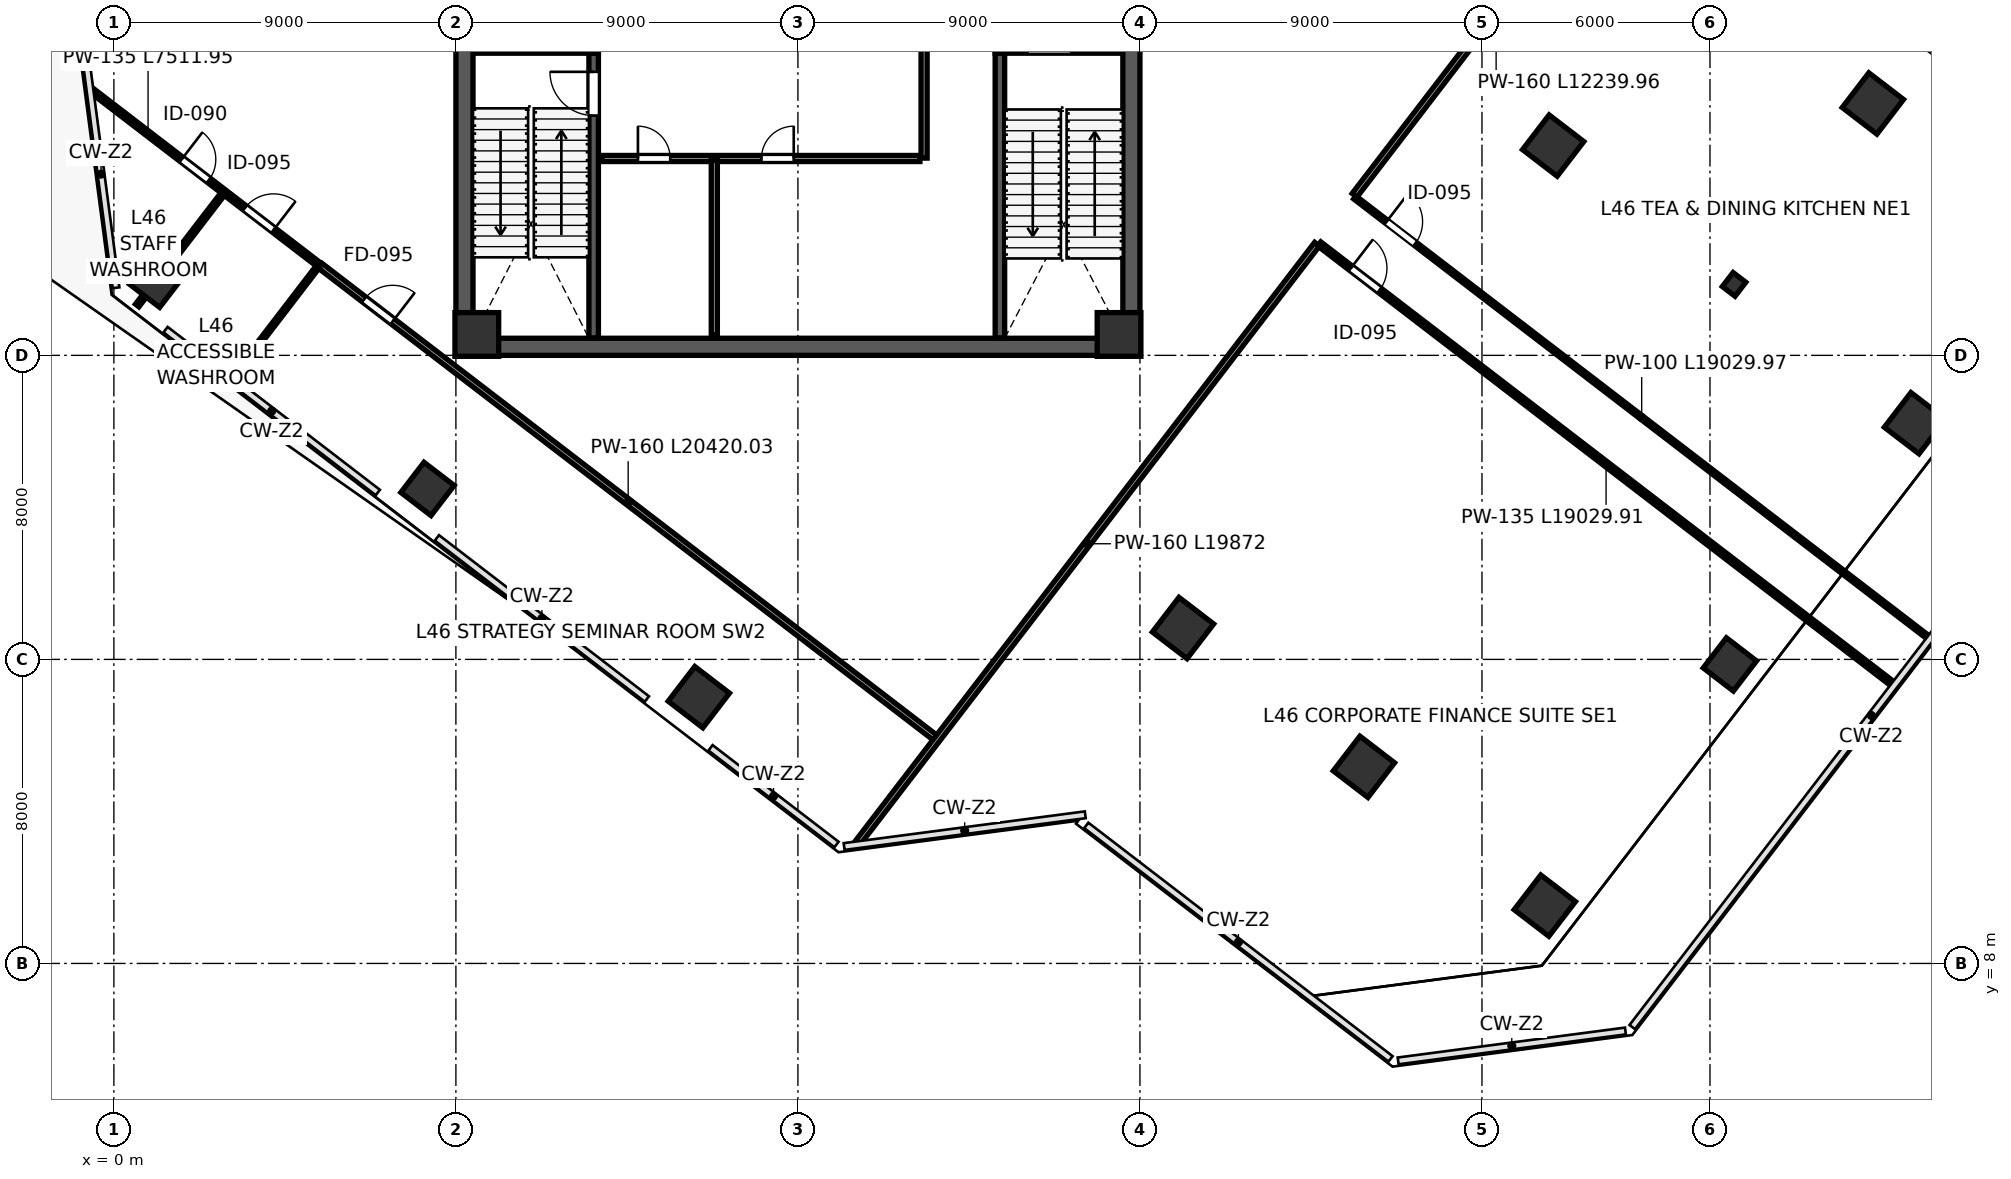
"""IFC4 building model, lengths in metres.
Left out: names, types, materials, properties, quantities, classifications, styles, units other than length and angle.
Written with IfcOpenShell. Run it as: python <this file> out.ifc"""

import sys

from ifc_helpers import new_model, si_unit, direction, frame, frame_2d, origin, origin_2d, place, context, subcontext, project, spatial, rectangle, i_section, extrude, source, transform, mapped, element, fill, save


model = new_model("IFC4")
c1 = context("Model", 3, precision=1e-05, world=origin(), true_north=direction((0.0, 1.0)))
c2 = subcontext(c1, "Body", "Model", "MODEL_VIEW")
j1 = project(units=[si_unit("LENGTHUNIT", "METRE"), si_unit("PLANEANGLEUNIT", "RADIAN")], contexts=[c1])
p1 = place(None, origin())
s1 = spatial("IfcSite", under=j1, at=p1, CompositionType="ELEMENT")
p2 = place(p1, origin())
s2 = spatial("IfcBuilding", under=s1, at=p2, CompositionType="ELEMENT")
p3 = place(p2, frame((0.0, 0.0, 204.4)))
s3 = spatial("IfcBuildingStorey", under=s2, at=p3, CompositionType="ELEMENT", Elevation=204.4)
m1 = source(origin(), c2, "Body", "SweptSolid", [
    extrude(rectangle(XDim=1.15, YDim=1.15, at=origin_2d()), origin(), (0.0, 0.0, 1.0), 5.399),
])
for number, where, z_axis, x_axis in (
    (1, (9.55, 24.55, 0.001), (0.0, 0.0, 1.0), (1.0, 0.0, 0.0)),
    (2, (26.45, 24.55, 0.001), (0.0, 0.0, 1.0), (1.0, 0.0, 0.0)),
):
    element("IfcColumn", number, at=place(p3, frame(where, z_axis=z_axis, x_axis=x_axis)), inside=s3, PredefinedType="COLUMN", context=c2, shape_type="MappedRepresentation", body=[
        mapped(m1, transform((0.0, 0.0, 0.0), scale=1.0)),
    ])
m2 = source(origin(), c2, "Body", "SweptSolid", [
    extrude(rectangle(XDim=1.0, YDim=1.0, at=origin_2d()), origin(), (0.0, 0.0, 1.0), 5.399),
])
for number, where, z_axis, x_axis in (
    (3, (1.112, 25.964, 0.001), (0.0, 0.0, 1.0), (-0.793, 0.609, 0.0)),
    (4, (8.253, 20.485, 0.001), (0.0, 0.0, 1.0), (-0.793, 0.609, 0.0)),
):
    element("IfcColumn", number, at=place(p3, frame(where, z_axis=z_axis, x_axis=x_axis)), inside=s3, PredefinedType="COLUMN", context=c2, shape_type="MappedRepresentation", body=[
        mapped(m2, transform((0.0, 0.0, 0.0), scale=1.0)),
    ])
m3 = source(origin(), c2, "Body", "SweptSolid", [
    extrude(rectangle(XDim=1.15, YDim=1.15, at=origin_2d()), origin(), (0.0, 0.0, 1.0), 5.399),
])
p4 = place(p3, frame((15.393, 15.006, 0.001), z_axis=(0.0, 0.0, 1.0), x_axis=(-0.793353340291, 0.608761429009, 0.0)))
e5 = element("IfcColumn", 5, at=p4, inside=s3, PredefinedType="COLUMN", context=c2, shape_type="MappedRepresentation", body=[
    mapped(m3, transform((0.0, 0.0, 0.0), scale=1.0)),
])
for number, where, z_axis, x_axis in (
    (6, (28.134, 16.826, 0.001), (0.0, 0.0, 1.0), (-0.793, 0.609, 0.0)),
    (7, (37.874, 29.52, 0.001), (0.0, 0.0, 1.0), (-0.793, 0.609, 0.0)),
    (8, (32.894, 13.174, 0.001), (0.0, 0.0, 1.0), (-0.793, 0.609, 0.0)),
):
    element("IfcColumn", number, at=place(p3, frame(where, z_axis=z_axis, x_axis=x_axis)), inside=s3, PredefinedType="COLUMN", context=c2, shape_type="MappedRepresentation", body=[
        mapped(m1, transform((0.0, 0.0, 0.0), scale=1.0)),
    ])
m4 = source(origin(), c2, "Body", "SweptSolid", [
    extrude(i_section(OverallWidth=0.421, OverallDepth=0.465, WebThickness=0.045, FlangeThickness=0.072, FilletRadius=0.015, at=origin_2d()), origin(), (0.0, 0.0, 1.0), 5.399),
])
p5 = place(p3, frame((42.634, 25.867, 0.001), z_axis=(0.0, 0.0, 1.0), x_axis=(-0.793353340291, 0.608761429009, 0.0)))
e9 = element("IfcColumn", 9, at=p5, inside=s3, PredefinedType="COLUMN", context=c2, shape_type="MappedRepresentation", body=[
    mapped(m4, transform((0.0, 0.0, 0.0), scale=1.0)),
])
p6 = place(p3, frame((46.286, 30.627, 0.001), z_axis=(0.0, 0.0, 1.0), x_axis=(-0.793353340291, 0.608761429009, 0.0)))
e10 = element("IfcColumn", 10, at=p6, inside=s3, PredefinedType="COLUMN", context=c2, shape_type="MappedRepresentation", body=[
    mapped(m1, transform((0.0, 0.0, 0.0), scale=1.0)),
])
p7 = place(p3, frame((37.654, 9.521, 0.001), z_axis=(0.0, 0.0, 1.0), x_axis=(-0.793353340291, 0.608761429009, 0.0)))
e11 = element("IfcColumn", 11, at=p7, inside=s3, PredefinedType="COLUMN", context=c2, shape_type="MappedRepresentation", body=[
    mapped(m3, transform((0.0, 0.0, 0.0), scale=1.0)),
])
p8 = place(p3, frame((42.524, 15.868, 0.001), z_axis=(0.0, 0.0, 1.0), x_axis=(-0.793353340291, 0.608761429009, 0.0)))
e12 = element("IfcColumn", 12, at=p8, inside=s3, PredefinedType="COLUMN", context=c2, shape_type="MappedRepresentation", body=[
    mapped(m2, transform((0.0, 0.0, 0.0), scale=1.0)),
])
p9 = place(p3, frame((47.394, 22.215, 0.001), z_axis=(0.0, 0.0, 1.0), x_axis=(-0.793353340291, 0.608761429009, 0.0)))
e13 = element("IfcColumn", 13, at=p9, inside=s3, PredefinedType="COLUMN", context=c2, shape_type="MappedRepresentation", body=[
    mapped(m3, transform((0.0, 0.0, 0.0), scale=1.0)),
])
p10 = place(p3, frame((9.225, 24.45, 0.0), z_axis=(0.0, 0.0, 1.0), x_axis=(0.0, 1.0, 0.0)))
e14 = element("IfcWall", 14, at=p10, inside=s3, PredefinedType="SHEAR", context=c2, shape_type="SweptSolid", body=[
    extrude(rectangle(XDim=15.1, YDim=0.45, at=frame_2d((7.55, 0.0))), origin(), (0.0, 0.0, 1.0), 5.12),
])
p11 = place(p3, frame((26.775, 24.45, 0.0), z_axis=(0.0, 0.0, 1.0), x_axis=(0.0, 1.0, 0.0)))
e15 = element("IfcWall", 15, at=p11, inside=s3, PredefinedType="SHEAR", context=c2, shape_type="SweptSolid", body=[
    extrude(rectangle(XDim=15.1, YDim=0.45, at=frame_2d((7.55, 0.0))), origin(), (0.0, 0.0, 1.0), 5.12),
])
p12 = place(p11, frame((8.6, 0.0, 0.0)))
e16 = element("IfcOpeningElement", 16, at=p12, cuts=e15, PredefinedType="OPENING", context=c2, shape_type="SweptSolid", body=[
    extrude(rectangle(XDim=1.15, YDim=2.2, at=frame_2d((0.575, 1.1))), frame((0.0, 0.235, 0.0), z_axis=(0.0, -1.0, 0.0), x_axis=(1.0, 0.0, 0.0)), (0.0, 0.0, 1.0), 0.47),
])
p13 = place(p3, frame((9.0, 24.225, 0.0), z_axis=(0.0, 0.0, 1.0), x_axis=(1.0, 0.0, 0.0)))
e17 = element("IfcWall", 17, at=p13, inside=s3, PredefinedType="SHEAR", context=c2, shape_type="SweptSolid", body=[
    extrude(rectangle(XDim=18.0, YDim=0.45, at=frame_2d((9.0, 0.0))), origin(), (0.0, 0.0, 1.0), 5.12),
])
p14 = place(p3, frame((12.625, 24.46, 0.0), z_axis=(0.0, 0.0, 1.0), x_axis=(0.0, 1.0, 0.0)))
e18 = element("IfcWall", 18, at=p14, inside=s3, PredefinedType="SHEAR", context=c2, shape_type="SweptSolid", body=[
    extrude(rectangle(XDim=7.49, YDim=0.25, at=frame_2d((3.745, 0.0))), origin(), (0.0, 0.0, 1.0), 5.12),
])
p15 = place(p14, frame((5.85, 0.0, 0.0)))
e19 = element("IfcOpeningElement", 19, at=p15, cuts=e18, PredefinedType="OPENING", context=c2, shape_type="SweptSolid", body=[
    extrude(rectangle(XDim=1.15, YDim=2.2, at=frame_2d((0.575, 1.1))), frame((0.0, 0.135, 0.0), z_axis=(0.0, -1.0, 0.0), x_axis=(1.0, 0.0, 0.0)), (0.0, 0.0, 1.0), 0.27),
])
p16 = place(p3, frame((9.46, 32.075, 0.0), z_axis=(0.0, 0.0, 1.0), x_axis=(1.0, 0.0, 0.0)))
e20 = element("IfcWall", 20, at=p16, inside=s3, PredefinedType="SHEAR", context=c2, shape_type="SweptSolid", body=[
    extrude(rectangle(XDim=3.29, YDim=0.25, at=frame_2d((1.645, 0.0))), origin(), (0.0, 0.0, 1.0), 5.12),
])
p17 = place(p3, frame((23.315, 24.46, 0.0), z_axis=(0.0, 0.0, 1.0), x_axis=(0.0, 1.0, 0.0)))
e21 = element("IfcWall", 21, at=p17, inside=s3, PredefinedType="SHEAR", context=c2, shape_type="SweptSolid", body=[
    extrude(rectangle(XDim=7.49, YDim=0.25, at=frame_2d((3.745, 0.0))), origin(), (0.0, 0.0, 1.0), 5.12),
])
p18 = place(p3, frame((23.19, 32.075, 0.0), z_axis=(0.0, 0.0, 1.0), x_axis=(1.0, 0.0, 0.0)))
e22 = element("IfcWall", 22, at=p18, inside=s3, PredefinedType="SHEAR", context=c2, shape_type="SweptSolid", body=[
    extrude(rectangle(XDim=3.35, YDim=0.25, at=frame_2d((1.675, 0.0))), origin(), (0.0, 0.0, 1.0), 5.12),
])
p19 = place(p18, frame((0.85, 0.0, 0.0)))
e23 = element("IfcOpeningElement", 23, at=p19, cuts=e22, PredefinedType="OPENING", context=c2, shape_type="SweptSolid", body=[
    extrude(rectangle(XDim=1.15, YDim=2.2, at=frame_2d((0.575, 1.1))), frame((0.0, 0.135, 0.0), z_axis=(0.0, -1.0, 0.0), x_axis=(1.0, 0.0, 0.0)), (0.0, 0.0, 1.0), 0.27),
])
p20 = place(p3, frame((12.84, 29.18, 0.0), z_axis=(0.0, 0.0, 1.0), x_axis=(1.0, 0.0, 0.0)))
e24 = element("IfcWall", 24, at=p20, inside=s3, PredefinedType="PARTITIONING", context=c2, shape_type="SweptSolid", body=[
    extrude(rectangle(XDim=8.37, YDim=0.16, at=frame_2d((4.185, 0.0))), origin(), (0.0, 0.0, 1.0), 5.12),
])
p21 = place(p20, frame((0.95, 0.0, 0.0)))
e25 = element("IfcOpeningElement", 25, at=p21, cuts=e24, PredefinedType="OPENING", context=c2, shape_type="SweptSolid", body=[
    extrude(rectangle(XDim=0.85, YDim=2.1, at=frame_2d((0.425, 1.05))), frame((0.0, 0.09, 0.0), z_axis=(0.0, -1.0, 0.0), x_axis=(1.0, 0.0, 0.0)), (0.0, 0.0, 1.0), 0.18),
])
p22 = place(p20, frame((4.2, 0.0, 0.0)))
e26 = element("IfcOpeningElement", 26, at=p22, cuts=e24, PredefinedType="OPENING", context=c2, shape_type="SweptSolid", body=[
    extrude(rectangle(XDim=0.85, YDim=2.1, at=frame_2d((0.425, 1.05))), frame((0.0, 0.09, 0.0), z_axis=(0.0, -1.0, 0.0), x_axis=(1.0, 0.0, 0.0)), (0.0, 0.0, 1.0), 0.18),
])
p23 = place(p3, frame((15.8, 24.54, 0.0), z_axis=(0.0, 0.0, 1.0), x_axis=(0.0, 1.0, 0.0)))
e27 = element("IfcWall", 27, at=p23, inside=s3, PredefinedType="PARTITIONING", context=c2, shape_type="SweptSolid", body=[
    extrude(rectangle(XDim=4.6, YDim=0.16, at=frame_2d((2.3, 0.0))), origin(), (0.0, 0.0, 1.0), 5.12),
])
p24 = place(p3, frame((21.32, 29.19, 0.0), z_axis=(0.0, 0.0, 1.0), x_axis=(0.0, 1.0, 0.0)))
e28 = element("IfcWall", 28, at=p24, inside=s3, PredefinedType="PARTITIONING", context=c2, shape_type="SweptSolid", body=[
    extrude(rectangle(XDim=2.92, YDim=0.16, at=frame_2d((1.46, 0.0))), origin(), (0.0, 0.0, 1.0), 5.12),
])
p25 = place(p3, frame((0.613, 25.313, 0.0), z_axis=(0.0, 0.0, 1.0), x_axis=(0.608711199412, 0.79339188029, 0.0)))
e29 = element("IfcWall", 29, at=p25, inside=s3, PredefinedType="PARTITIONING", context=c2, shape_type="SweptSolid", body=[
    extrude(rectangle(XDim=3.72, YDim=0.115, at=frame_2d((1.86, 0.0))), origin(), (0.0, 0.0, 1.0), 4.355),
])
p26 = place(p3, frame((3.112, 23.396, 0.0), z_axis=(0.0, 0.0, 1.0), x_axis=(0.60874289599, 0.793367560833, 0.0)))
e30 = element("IfcWall", 30, at=p26, inside=s3, PredefinedType="PARTITIONING", context=c2, shape_type="SweptSolid", body=[
    extrude(rectangle(XDim=3.72, YDim=0.1, at=frame_2d((1.86, 0.0))), origin(), (0.0, 0.0, 1.0), 4.355),
])
p27 = place(p3, frame((-0.59, 30.976, 0.0), z_axis=(0.0, 0.0, 1.0), x_axis=(0.793344734921, -0.608772643581, 0.0)))
e31 = element("IfcWall", 31, at=p27, inside=s3, PredefinedType="PARTITIONING", context=c2, shape_type="SweptSolid", body=[
    extrude(rectangle(XDim=7.512, YDim=0.135, at=frame_2d((3.756, 0.0))), origin(), (0.0, 0.0, 1.0), 5.12),
])
p28 = place(p27, frame((2.99, 0.0, 0.0)))
e32 = element("IfcOpeningElement", 32, at=p28, cuts=e31, PredefinedType="OPENING", context=c2, shape_type="SweptSolid", body=[
    extrude(rectangle(XDim=0.9, YDim=2.15, at=frame_2d((0.45, 1.075))), frame((0.0, 0.078, 0.0), z_axis=(0.0, -1.0, 0.0), x_axis=(1.0, 0.0, 0.0)), (0.0, 0.0, 1.0), 0.155),
])
p29 = place(p27, frame((5.09, 0.0, 0.0)))
e33 = element("IfcOpeningElement", 33, at=p29, cuts=e31, PredefinedType="OPENING", context=c2, shape_type="SweptSolid", body=[
    extrude(rectangle(XDim=0.95, YDim=2.15, at=frame_2d((0.475, 1.075))), frame((0.0, 0.078, 0.0), z_axis=(0.0, -1.0, 0.0), x_axis=(1.0, 0.0, 0.0)), (0.0, 0.0, 1.0), 0.155),
])
p30 = place(p3, frame((5.433, 26.354, 0.0), z_axis=(0.0, 0.0, 1.0), x_axis=(0.793362099466, -0.60875001366, 0.0)))
e34 = element("IfcWall", 34, at=p30, inside=s3, PredefinedType="PARTITIONING", context=c2, shape_type="SweptSolid", body=[
    extrude(rectangle(XDim=20.42, YDim=0.16, at=frame_2d((10.21, 0.0))), origin(), (0.0, 0.0, 1.0), 5.12),
])
p31 = place(p30, frame((1.45, 0.0, 0.0)))
e35 = element("IfcOpeningElement", 35, at=p31, cuts=e34, PredefinedType="OPENING", context=c2, shape_type="SweptSolid", body=[
    extrude(rectangle(XDim=0.95, YDim=2.15, at=frame_2d((0.475, 1.075))), frame((0.0, 0.09, 0.0), z_axis=(0.0, -1.0, 0.0), x_axis=(1.0, 0.0, 0.0)), (0.0, 0.0, 1.0), 0.18),
])
p32 = place(p3, frame((32.647, 28.211, 0.0), z_axis=(0.0, 0.0, 1.0), x_axis=(0.608743464117, 0.793367124914, 0.0)))
e36 = element("IfcWall", 36, at=p32, inside=s3, PredefinedType="PARTITIONING", context=c2, shape_type="SweptSolid", body=[
    extrude(rectangle(XDim=12.24, YDim=0.16, at=frame_2d((6.12, 0.0))), origin(), (0.0, 0.0, 1.0), 4.355),
])
p33 = place(p3, frame((19.564, 11.16, 0.0), z_axis=(0.0, 0.0, 1.0), x_axis=(0.608754410964, 0.793358725377, 0.0)))
e37 = element("IfcWall", 37, at=p33, inside=s3, PredefinedType="PARTITIONING", context=c2, shape_type="SweptSolid", body=[
    extrude(rectangle(XDim=19.872, YDim=0.16, at=frame_2d((9.936, 0.0))), origin(), (0.0, 0.0, 1.0), 5.12),
])
p34 = place(p3, frame((32.654, 28.155, 0.0), z_axis=(0.0, 0.0, 1.0), x_axis=(0.793356444093, -0.608757384034, 0.0)))
e38 = element("IfcWall", 38, at=p34, inside=s3, PredefinedType="PARTITIONING", context=c2, shape_type="SweptSolid", body=[
    extrude(rectangle(XDim=19.03, YDim=0.1, at=frame_2d((9.515, 0.0))), origin(), (0.0, 0.0, 1.0), 4.413),
])
p35 = place(p34, frame((1.05, 0.0, 0.0)))
e39 = element("IfcOpeningElement", 39, at=p35, cuts=e38, PredefinedType="OPENING", context=c2, shape_type="SweptSolid", body=[
    extrude(rectangle(XDim=0.95, YDim=2.15, at=frame_2d((0.475, 1.075))), frame((0.0, 0.06, 0.0), z_axis=(0.0, -1.0, 0.0), x_axis=(1.0, 0.0, 0.0)), (0.0, 0.0, 1.0), 0.12),
])
p36 = place(p3, frame((31.717, 26.933, 0.0), z_axis=(0.0, 0.0, 1.0), x_axis=(0.793356444093, -0.608757384034, 0.0)))
e40 = element("IfcWall", 40, at=p36, inside=s3, PredefinedType="PARTITIONING", context=c2, shape_type="SweptSolid", body=[
    extrude(rectangle(XDim=19.03, YDim=0.135, at=frame_2d((9.515, 0.0))), origin(), (0.0, 0.0, 1.0), 4.413),
])
p37 = place(p36, frame((1.05, 0.0, 0.0)))
e41 = element("IfcOpeningElement", 41, at=p37, cuts=e40, PredefinedType="OPENING", context=c2, shape_type="SweptSolid", body=[
    extrude(rectangle(XDim=0.95, YDim=2.15, at=frame_2d((0.475, 1.075))), frame((0.0, 0.078, 0.0), z_axis=(0.0, -1.0, 0.0), x_axis=(1.0, 0.0, 0.0)), (0.0, 0.0, 1.0), 0.155),
])
m5 = source(origin(), c2, "Body", "SweptSolid", [
    extrude(rectangle(XDim=1.15, YDim=2.2, at=frame_2d((0.575, 1.1))), frame((0.0, 0.025, 0.0), z_axis=(0.0, -1.0, 0.0), x_axis=(1.0, 0.0, 0.0)), (0.0, 0.0, 1.0), 0.05),
])
p38 = place(p15, origin())
e42 = element("IfcDoor", 42, at=p38, inside=s3, OperationType="SINGLE_SWING_RIGHT", PredefinedType="DOOR", context=c2, shape_type="MappedRepresentation", body=[
    mapped(m5, transform((0.0, 0.0, 0.0), scale=1.0)),
])
fill(e19, e42)
m6 = source(origin(), c2, "Body", "SweptSolid", [
    extrude(rectangle(XDim=0.85, YDim=2.1, at=frame_2d((0.425, 1.05))), frame((0.0, 0.025, 0.0), z_axis=(0.0, -1.0, 0.0), x_axis=(1.0, 0.0, 0.0)), (0.0, 0.0, 1.0), 0.05),
])
p39 = place(p21, origin())
e43 = element("IfcDoor", 43, at=p39, inside=s3, OperationType="SINGLE_SWING_LEFT", PredefinedType="DOOR", context=c2, shape_type="MappedRepresentation", body=[
    mapped(m6, transform((0.0, 0.0, 0.0), scale=1.0)),
])
fill(e25, e43)
p40 = place(p22, origin())
e44 = element("IfcDoor", 44, at=p40, inside=s3, OperationType="SINGLE_SWING_RIGHT", PredefinedType="DOOR", context=c2, shape_type="MappedRepresentation", body=[
    mapped(m6, transform((0.0, 0.0, 0.0), scale=1.0)),
])
fill(e26, e44)
m7 = source(origin(), c2, "Body", "SweptSolid", [
    extrude(rectangle(XDim=0.9, YDim=2.15, at=frame_2d((0.45, 1.075))), frame((0.0, 0.025, 0.0), z_axis=(0.0, -1.0, 0.0), x_axis=(1.0, 0.0, 0.0)), (0.0, 0.0, 1.0), 0.05),
])
p41 = place(p28, origin())
e45 = element("IfcDoor", 45, at=p41, inside=s3, OperationType="SINGLE_SWING_LEFT", PredefinedType="DOOR", context=c2, shape_type="MappedRepresentation", body=[
    mapped(m7, transform((0.0, 0.0, 0.0), scale=1.0)),
])
fill(e32, e45)
m8 = source(origin(), c2, "Body", "SweptSolid", [
    extrude(rectangle(XDim=0.95, YDim=2.15, at=frame_2d((0.475, 1.075))), frame((0.0, 0.025, 0.0), z_axis=(0.0, -1.0, 0.0), x_axis=(1.0, 0.0, 0.0)), (0.0, 0.0, 1.0), 0.05),
])
p42 = place(p29, origin())
e46 = element("IfcDoor", 46, at=p42, inside=s3, OperationType="SINGLE_SWING_RIGHT", PredefinedType="DOOR", context=c2, shape_type="MappedRepresentation", body=[
    mapped(m8, transform((0.0, 0.0, 0.0), scale=1.0)),
])
fill(e33, e46)
m9 = source(origin(), c2, "Body", "SweptSolid", [
    extrude(rectangle(XDim=0.95, YDim=2.15, at=frame_2d((0.475, 1.075))), frame((0.0, 0.025, 0.0), z_axis=(0.0, -1.0, 0.0), x_axis=(1.0, 0.0, 0.0)), (0.0, 0.0, 1.0), 0.05),
])
p43 = place(p31, origin())
e47 = element("IfcDoor", 47, at=p43, inside=s3, OperationType="SINGLE_SWING_RIGHT", PredefinedType="DOOR", context=c2, shape_type="MappedRepresentation", body=[
    mapped(m9, transform((0.0, 0.0, 0.0), scale=1.0)),
])
fill(e35, e47)
p44 = place(p35, origin())
e48 = element("IfcDoor", 48, at=p44, inside=s3, OperationType="SINGLE_SWING_LEFT", PredefinedType="DOOR", context=c2, shape_type="MappedRepresentation", body=[
    mapped(m8, transform((0.0, 0.0, 0.0), scale=1.0)),
])
fill(e39, e48)
p45 = place(p37, origin())
e49 = element("IfcDoor", 49, at=p45, inside=s3, OperationType="SINGLE_SWING_LEFT", PredefinedType="DOOR", context=c2, shape_type="MappedRepresentation", body=[
    mapped(m8, transform((0.0, 0.0, 0.0), scale=1.0)),
])
fill(e41, e49)
save(model, sys.argv[1])
